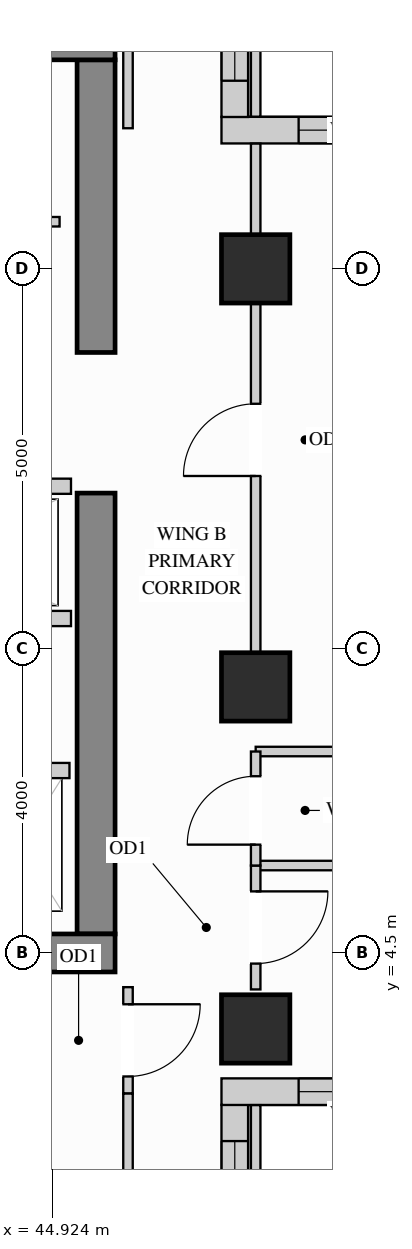
"""IFC4 building model, lengths in metres.
Left out: names, types, materials, properties, quantities, classifications, styles, units other than length and angle.
Written with IfcOpenShell. Run it as: python <this file> out.ifc"""

import sys

from ifc_helpers import new_model, si_unit, direction, frame, frame_2d, origin, origin_2d, place, context, subcontext, project, spatial, rectangle, extrude, source, transform, mapped, element, fill, save


model = new_model("IFC4")
c1 = context("Model", 3, precision=1e-05, world=origin(), true_north=direction((0.0, 1.0)))
c2 = subcontext(c1, "Body", "Model", "MODEL_VIEW")
j1 = project(units=[si_unit("LENGTHUNIT", "METRE"), si_unit("PLANEANGLEUNIT", "RADIAN")], contexts=[c1])
p1 = place(None, origin())
s1 = spatial("IfcSite", under=j1, at=p1, CompositionType="ELEMENT")
p2 = place(p1, origin())
s2 = spatial("IfcBuilding", under=s1, at=p2, CompositionType="ELEMENT")
p3 = place(p2, frame((0.0, 0.0, 255.6)))
s3 = spatial("IfcBuildingStorey", under=s2, at=p3, CompositionType="ELEMENT", Elevation=255.6)
m1 = source(origin(), c2, "Body", "SweptSolid", [
    extrude(rectangle(XDim=0.9, YDim=0.9, at=origin_2d()), origin(), (0.0, 0.0, 1.0), 3.4),
])
for number, where, z_axis, x_axis in (
    (1, (47.6, 13.5, 0.0), (0.0, 0.0, 1.0), (1.0, 0.0, 0.0)),
    (2, (47.6, 3.5, 0.0), (0.0, 0.0, 1.0), (1.0, 0.0, 0.0)),
    (3, (47.6, 8.0, 0.0), (0.0, 0.0, 1.0), (1.0, 0.0, 0.0)),
):
    element("IfcColumn", number, at=place(p3, frame(where, z_axis=z_axis, x_axis=x_axis)), inside=s3, PredefinedType="COLUMN", context=c2, shape_type="MappedRepresentation", body=[
        mapped(m1, transform((0.0, 0.0, 0.0), x_axis=(1.0, 0.0, 0.0), y_axis=(0.0, 1.0, 0.0), z_axis=(0.0, 0.0, 1.0))),
    ])
m2 = source(origin(), c2, "Body", "SweptSolid", [
    extrude(rectangle(XDim=5.8, YDim=0.5, at=frame_2d((2.9, 0.0))), origin(), (0.0, 0.0, 1.0), 3.4),
])
p4 = place(p3, frame((45.5, 4.75, 0.0), z_axis=(0.0, 0.0, 1.0), x_axis=(0.0, 1.0, 0.0)))
e4 = element("IfcWall", 4, at=p4, inside=s3, PredefinedType="SHEAR", context=c2, shape_type="MappedRepresentation", body=[
    mapped(m2, transform((0.0, 0.0, 0.0), x_axis=(1.0, 0.0, 0.0), y_axis=(0.0, 1.0, 0.0), z_axis=(0.0, 0.0, 1.0))),
])
m3 = source(origin(), c2, "Body", "SweptSolid", [
    extrude(rectangle(XDim=3.85, YDim=0.5, at=frame_2d((1.925, 0.0))), origin(), (0.0, 0.0, 1.0), 3.4),
])
p5 = place(p3, frame((45.5, 12.4, 0.0), z_axis=(0.0, 0.0, 1.0), x_axis=(0.0, 1.0, 0.0)))
e5 = element("IfcWall", 5, at=p5, inside=s3, PredefinedType="SHEAR", context=c2, shape_type="MappedRepresentation", body=[
    mapped(m3, transform((0.0, 0.0, 0.0), x_axis=(1.0, 0.0, 0.0), y_axis=(0.0, 1.0, 0.0), z_axis=(0.0, 0.0, 1.0))),
])
m4 = source(origin(), c2, "Body", "SweptSolid", [
    extrude(rectangle(XDim=10.0, YDim=0.5, at=frame_2d((5.0, 0.0))), origin(), (0.0, 0.0, 1.0), 3.4),
])
for number, where, z_axis, x_axis in (
    (6, (35.75, 16.5, 0.0), (0.0, 0.0, 1.0), (1.0, 0.0, 0.0)),
    (7, (35.75, 4.5, 0.0), (0.0, 0.0, 1.0), (1.0, 0.0, 0.0)),
):
    element("IfcWall", number, at=place(p3, frame(where, z_axis=z_axis, x_axis=x_axis)), inside=s3, PredefinedType="SHEAR", context=c2, shape_type="MappedRepresentation", body=[
        mapped(m4, transform((0.0, 0.0, 0.0), x_axis=(1.0, 0.0, 0.0), y_axis=(0.0, 1.0, 0.0), z_axis=(0.0, 0.0, 1.0))),
    ])
p6 = place(p3, frame((47.325, 0.348, 0.0), z_axis=(0.0, 0.0, 1.0), x_axis=(0.0, 1.0, 0.0)))
e8 = element("IfcWall", 8, at=p6, inside=s3, PredefinedType="SOLIDWALL", context=c2, shape_type="SweptSolid", body=[
    extrude(rectangle(XDim=2.154, YDim=0.35, at=frame_2d((1.077, 0.0))), origin(), (0.0, 0.0, 1.0), 3.385),
])
p7 = place(p6, frame((0.477, 0.0, 0.78)))
e9 = element("IfcOpeningElement", 9, at=p7, cuts=e8, PredefinedType="OPENING", context=c2, shape_type="SweptSolid", body=[
    extrude(rectangle(XDim=1.2, YDim=2.25, at=frame_2d((0.6, 1.125))), frame((0.0, 0.185, 0.0), z_axis=(0.0, -1.0, 0.0), x_axis=(1.0, 0.0, 0.0)), (0.0, 0.0, 1.0), 0.37),
])
p8 = place(p3, frame((47.15, 2.675, 0.0), z_axis=(0.0, 0.0, 1.0), x_axis=(1.0, 0.0, 0.0)))
e10 = element("IfcWall", 10, at=p8, inside=s3, PredefinedType="SOLIDWALL", context=c2, shape_type="SweptSolid", body=[
    extrude(rectangle(XDim=2.85, YDim=0.35, at=frame_2d((1.425, 0.0))), origin(), (0.0, 0.0, 1.0), 3.385),
])
p9 = place(p8, frame((1.015, 0.0, 0.78)))
e11 = element("IfcOpeningElement", 11, at=p9, cuts=e10, PredefinedType="OPENING", context=c2, shape_type="SweptSolid", body=[
    extrude(rectangle(XDim=1.2, YDim=2.25, at=frame_2d((0.6, 1.125))), frame((0.0, 0.185, 0.0), z_axis=(0.0, -1.0, 0.0), x_axis=(1.0, 0.0, 0.0)), (0.0, 0.0, 1.0), 0.37),
])
p10 = place(p3, frame((50.0, 15.325, 0.0), z_axis=(0.0, 0.0, 1.0), x_axis=(-1.0, 0.0, 0.0)))
e12 = element("IfcWall", 12, at=p10, inside=s3, PredefinedType="SOLIDWALL", context=c2, shape_type="SweptSolid", body=[
    extrude(rectangle(XDim=2.85, YDim=0.35, at=frame_2d((1.425, 0.0))), origin(), (0.0, 0.0, 1.0), 3.385),
])
p11 = place(p10, frame((0.635, 0.0, 0.78)))
e13 = element("IfcOpeningElement", 13, at=p11, cuts=e12, PredefinedType="OPENING", context=c2, shape_type="SweptSolid", body=[
    extrude(rectangle(XDim=1.2, YDim=2.25, at=frame_2d((0.6, 1.125))), frame((0.0, 0.185, 0.0), z_axis=(0.0, -1.0, 0.0), x_axis=(1.0, 0.0, 0.0)), (0.0, 0.0, 1.0), 0.37),
])
p12 = place(p3, frame((47.325, 15.498, 0.0), z_axis=(0.0, 0.0, 1.0), x_axis=(0.0, 1.0, 0.0)))
e14 = element("IfcWall", 14, at=p12, inside=s3, PredefinedType="SOLIDWALL", context=c2, shape_type="SweptSolid", body=[
    extrude(rectangle(XDim=2.154, YDim=0.35, at=frame_2d((1.077, 0.0))), origin(), (0.0, 0.0, 1.0), 3.385),
])
p13 = place(p12, frame((0.477, 0.0, 0.78)))
e15 = element("IfcOpeningElement", 15, at=p13, cuts=e14, PredefinedType="OPENING", context=c2, shape_type="SweptSolid", body=[
    extrude(rectangle(XDim=1.2, YDim=2.25, at=frame_2d((0.6, 1.125))), frame((0.0, 0.185, 0.0), z_axis=(0.0, -1.0, 0.0), x_axis=(1.0, 0.0, 0.0)), (0.0, 0.0, 1.0), 0.37),
])
p14 = place(p3, frame((36.5, 14.12, 0.0), z_axis=(0.0, 0.0, 1.0), x_axis=(1.0, 0.0, 0.0)))
e16 = element("IfcWall", 16, at=p14, inside=s3, PredefinedType="PARTITIONING", context=c2, shape_type="SweptSolid", body=[
    extrude(rectangle(XDim=8.52, YDim=0.125, at=frame_2d((4.26, 0.0))), origin(), (0.0, 0.0, 1.0), 3.385),
])
p15 = place(p14, frame((3.785, 0.0, 0.0)))
e17 = element("IfcOpeningElement", 17, at=p15, cuts=e16, PredefinedType="OPENING", context=c2, shape_type="SweptSolid", body=[
    extrude(rectangle(XDim=0.95, YDim=2.15, at=frame_2d((0.475, 1.075))), frame((0.0, 0.073, 0.0), z_axis=(0.0, -1.0, 0.0), x_axis=(1.0, 0.0, 0.0)), (0.0, 0.0, 1.0), 0.145),
])
m5 = source(origin(), c2, "Body", "SweptSolid", [
    extrude(rectangle(XDim=2.048, YDim=0.125, at=frame_2d((1.024, 0.0))), origin(), (0.0, 0.0, 1.0), 3.385),
])
for number, where, z_axis, x_axis in (
    (18, (47.6, 5.65, 0.0), (0.0, 0.0, 1.0), (1.0, 0.0, 0.0)),
    (19, (47.6, 7.15, 0.0), (0.0, 0.0, 1.0), (1.0, 0.0, 0.0)),
):
    element("IfcWall", number, at=place(p3, frame(where, z_axis=z_axis, x_axis=x_axis)), inside=s3, PredefinedType="PARTITIONING", context=c2, shape_type="MappedRepresentation", body=[
        mapped(m5, transform((0.0, 0.0, 0.0), x_axis=(1.0, 0.0, 0.0), y_axis=(0.0, 1.0, 0.0), z_axis=(0.0, 0.0, 1.0))),
    ])
p16 = place(p3, frame((47.6, 4.02, 0.0), z_axis=(0.0, 0.0, 1.0), x_axis=(0.0, 1.0, 0.0)))
e20 = element("IfcWall", 20, at=p16, inside=s3, PredefinedType="PARTITIONING", context=c2, shape_type="SweptSolid", body=[
    extrude(rectangle(XDim=1.63, YDim=0.125, at=frame_2d((0.815, 0.0))), origin(), (0.0, 0.0, 1.0), 2.773),
])
p17 = place(p16, frame((0.34, 0.0, 0.0)))
e21 = element("IfcOpeningElement", 21, at=p17, cuts=e20, PredefinedType="OPENING", context=c2, shape_type="SweptSolid", body=[
    extrude(rectangle(XDim=0.95, YDim=2.15, at=frame_2d((0.475, 1.075))), frame((0.0, 0.073, 0.0), z_axis=(0.0, -1.0, 0.0), x_axis=(1.0, 0.0, 0.0)), (0.0, 0.0, 1.0), 0.145),
])
m6 = source(origin(), c2, "Body", "SweptSolid", [
    extrude(rectangle(XDim=2.148, YDim=0.125, at=frame_2d((1.074, 0.0))), origin(), (0.0, 0.0, 1.0), 3.385),
])
p18 = place(p3, frame((47.6, 0.35, 0.0), z_axis=(0.0, 0.0, 1.0), x_axis=(0.0, 1.0, 0.0)))
e22 = element("IfcWall", 22, at=p18, inside=s3, PredefinedType="PARTITIONING", context=c2, shape_type="MappedRepresentation", body=[
    mapped(m6, transform((0.0, 0.0, 0.0), x_axis=(1.0, 0.0, 0.0), y_axis=(0.0, 1.0, 0.0), z_axis=(0.0, 0.0, 1.0))),
])
p19 = place(p3, frame((47.6, 8.45, 0.0), z_axis=(0.0, 0.0, 1.0), x_axis=(0.0, 1.0, 0.0)))
e23 = element("IfcWall", 23, at=p19, inside=s3, PredefinedType="PARTITIONING", context=c2, shape_type="SweptSolid", body=[
    extrude(rectangle(XDim=4.6, YDim=0.125, at=frame_2d((2.3, 0.0))), origin(), (0.0, 0.0, 1.0), 2.773),
])
p20 = place(p19, frame((2.325, 0.0, 0.0)))
e24 = element("IfcOpeningElement", 24, at=p20, cuts=e23, PredefinedType="OPENING", context=c2, shape_type="SweptSolid", body=[
    extrude(rectangle(XDim=0.95, YDim=2.15, at=frame_2d((0.475, 1.075))), frame((0.0, 0.073, 0.0), z_axis=(0.0, -1.0, 0.0), x_axis=(1.0, 0.0, 0.0)), (0.0, 0.0, 1.0), 0.145),
])
m7 = source(origin(), c2, "Body", "SweptSolid", [
    extrude(rectangle(XDim=1.198, YDim=0.125, at=frame_2d((0.599, 0.0))), origin(), (0.0, 0.0, 1.0), 3.385),
])
p21 = place(p3, frame((47.6, 13.95, 0.0), z_axis=(0.0, 0.0, 1.0), x_axis=(0.0, 1.0, 0.0)))
e25 = element("IfcWall", 25, at=p21, inside=s3, PredefinedType="PARTITIONING", context=c2, shape_type="MappedRepresentation", body=[
    mapped(m7, transform((0.0, 0.0, 0.0), x_axis=(1.0, 0.0, 0.0), y_axis=(0.0, 1.0, 0.0), z_axis=(0.0, 0.0, 1.0))),
])
p22 = place(p3, frame((47.6, 15.502, 0.0), z_axis=(0.0, 0.0, 1.0), x_axis=(0.0, 1.0, 0.0)))
e26 = element("IfcWall", 26, at=p22, inside=s3, PredefinedType="PARTITIONING", context=c2, shape_type="MappedRepresentation", body=[
    mapped(m6, transform((0.0, 0.0, 0.0), x_axis=(1.0, 0.0, 0.0), y_axis=(0.0, 1.0, 0.0), z_axis=(0.0, 0.0, 1.0))),
])
p23 = place(p3, frame((47.6, 5.65, 0.0), z_axis=(0.0, 0.0, 1.0), x_axis=(0.0, 1.0, 0.0)))
e27 = element("IfcWall", 27, at=p23, inside=s3, PredefinedType="PARTITIONING", context=c2, shape_type="SweptSolid", body=[
    extrude(rectangle(XDim=1.5, YDim=0.125, at=frame_2d((0.75, 0.0))), origin(), (0.0, 0.0, 1.0), 2.773),
])
p24 = place(p23, frame((0.275, 0.0, 0.0)))
e28 = element("IfcOpeningElement", 28, at=p24, cuts=e27, PredefinedType="OPENING", context=c2, shape_type="SweptSolid", body=[
    extrude(rectangle(XDim=0.9, YDim=2.15, at=frame_2d((0.45, 1.075))), frame((0.0, 0.073, 0.0), z_axis=(0.0, -1.0, 0.0), x_axis=(1.0, 0.0, 0.0)), (0.0, 0.0, 1.0), 0.145),
])
m8 = source(origin(), c2, "Body", "SweptSolid", [
    extrude(rectangle(XDim=2.298, YDim=0.125, at=frame_2d((1.149, 0.0))), origin(), (0.0, 0.0, 1.0), 3.385),
])
p25 = place(p3, frame((45.92, 15.35, 0.0), z_axis=(0.0, 0.0, 1.0), x_axis=(0.0, 1.0, 0.0)))
e29 = element("IfcWall", 29, at=p25, inside=s3, PredefinedType="PARTITIONING", context=c2, shape_type="MappedRepresentation", body=[
    mapped(m8, transform((0.0, 0.0, 0.0), x_axis=(1.0, 0.0, 0.0), y_axis=(0.0, 1.0, 0.0), z_axis=(0.0, 0.0, 1.0))),
])
p26 = place(p3, frame((45.92, 2.65, 0.0), z_axis=(0.0, 0.0, 1.0), x_axis=(0.0, 1.0, 0.0)))
e30 = element("IfcWall", 30, at=p26, inside=s3, PredefinedType="PARTITIONING", context=c2, shape_type="SweptSolid", body=[
    extrude(rectangle(XDim=1.4, YDim=0.125, at=frame_2d((0.7, 0.0))), origin(), (0.0, 0.0, 1.0), 3.385),
])
p27 = place(p26, frame((0.225, 0.0, 0.0)))
e31 = element("IfcOpeningElement", 31, at=p27, cuts=e30, PredefinedType="OPENING", context=c2, shape_type="SweptSolid", body=[
    extrude(rectangle(XDim=0.95, YDim=2.15, at=frame_2d((0.475, 1.075))), frame((0.0, 0.073, 0.0), z_axis=(0.0, -1.0, 0.0), x_axis=(1.0, 0.0, 0.0)), (0.0, 0.0, 1.0), 0.145),
])
p28 = place(p3, frame((45.92, 0.352, 0.0), z_axis=(0.0, 0.0, 1.0), x_axis=(0.0, 1.0, 0.0)))
e32 = element("IfcWall", 32, at=p28, inside=s3, PredefinedType="PARTITIONING", context=c2, shape_type="MappedRepresentation", body=[
    mapped(m8, transform((0.0, 0.0, 0.0), x_axis=(1.0, 0.0, 0.0), y_axis=(0.0, 1.0, 0.0), z_axis=(0.0, 0.0, 1.0))),
])
m9 = source(origin(), c2, "Body", "SweptSolid", [
    extrude(rectangle(XDim=1.3, YDim=0.2, at=frame_2d((0.65, 0.0))), origin(), (0.0, 0.0, 1.0), 3.385),
])
p29 = place(p3, frame((43.85, 6.9, 0.0), z_axis=(0.0, 0.0, 1.0), x_axis=(1.0, 0.0, 0.0)))
e33 = element("IfcWall", 33, at=p29, inside=s3, PredefinedType="PARTITIONING", context=c2, shape_type="MappedRepresentation", body=[
    mapped(m9, transform((0.0, 0.0, 0.0), x_axis=(1.0, 0.0, 0.0), y_axis=(0.0, 1.0, 0.0), z_axis=(0.0, 0.0, 1.0))),
])
m10 = source(origin(), c2, "Body", "SweptSolid", [
    extrude(rectangle(XDim=3.49, YDim=0.2, at=frame_2d((1.745, 0.0))), origin(), (0.0, 0.0, 1.0), 3.385),
])
for number, where, z_axis, x_axis in (
    (34, (41.68, 10.64, 0.0), (0.0, 0.0, 1.0), (1.0, 0.0, 0.0)),
    (35, (41.68, 8.9, 0.0), (0.0, 0.0, 1.0), (1.0, 0.0, 0.0)),
):
    element("IfcWall", number, at=place(p3, frame(where, z_axis=z_axis, x_axis=x_axis)), inside=s3, PredefinedType="PARTITIONING", context=c2, shape_type="MappedRepresentation", body=[
        mapped(m10, transform((0.0, 0.0, 0.0), x_axis=(1.0, 0.0, 0.0), y_axis=(0.0, 1.0, 0.0), z_axis=(0.0, 0.0, 1.0))),
    ])
m11 = source(origin(), c2, "Body", "SweptSolid", [
    extrude(rectangle(XDim=0.95, YDim=2.15, at=frame_2d((0.475, 1.075))), frame((0.0, 0.025, 0.0), z_axis=(0.0, -1.0, 0.0), x_axis=(1.0, 0.0, 0.0)), (0.0, 0.0, 1.0), 0.05),
])
p30 = place(p27, origin())
e36 = element("IfcDoor", 36, at=p30, inside=s3, OperationType="SINGLE_SWING_RIGHT", PredefinedType="DOOR", context=c2, shape_type="MappedRepresentation", body=[
    mapped(m11, transform((0.0, 0.0, 0.0), x_axis=(1.0, 0.0, 0.0), y_axis=(0.0, 1.0, 0.0), z_axis=(0.0, 0.0, 1.0))),
])
fill(e31, e36)
p31 = place(p17, origin())
e37 = element("IfcDoor", 37, at=p31, inside=s3, OperationType="SINGLE_SWING_RIGHT", PredefinedType="DOOR", context=c2, shape_type="MappedRepresentation", body=[
    mapped(m11, transform((0.0, 0.0, 0.0), x_axis=(1.0, 0.0, 0.0), y_axis=(0.0, 1.0, 0.0), z_axis=(0.0, 0.0, 1.0))),
])
fill(e21, e37)
p32 = place(p20, origin())
e38 = element("IfcDoor", 38, at=p32, inside=s3, OperationType="SINGLE_SWING_LEFT", PredefinedType="DOOR", context=c2, shape_type="MappedRepresentation", body=[
    mapped(m11, transform((0.0, 0.0, 0.0), x_axis=(1.0, 0.0, 0.0), y_axis=(0.0, 1.0, 0.0), z_axis=(0.0, 0.0, 1.0))),
])
fill(e24, e38)
m12 = source(origin(), c2, "Body", "SweptSolid", [
    extrude(rectangle(XDim=0.9, YDim=2.15, at=frame_2d((0.45, 1.075))), frame((0.0, 0.025, 0.0), z_axis=(0.0, -1.0, 0.0), x_axis=(1.0, 0.0, 0.0)), (0.0, 0.0, 1.0), 0.05),
])
p33 = place(p24, origin())
e39 = element("IfcDoor", 39, at=p33, inside=s3, OperationType="SINGLE_SWING_LEFT", PredefinedType="DOOR", context=c2, shape_type="MappedRepresentation", body=[
    mapped(m12, transform((0.0, 0.0, 0.0), x_axis=(1.0, 0.0, 0.0), y_axis=(0.0, 1.0, 0.0), z_axis=(0.0, 0.0, 1.0))),
])
fill(e28, e39)
m13 = source(origin(), c2, "Body", "SweptSolid", [
    extrude(rectangle(XDim=1.2, YDim=2.25, at=frame_2d((0.6, 1.125))), frame((0.0, 0.03, 0.0), z_axis=(0.0, -1.0, 0.0), x_axis=(1.0, 0.0, 0.0)), (0.0, 0.0, 1.0), 0.06),
])
p34 = place(p7, origin())
e40 = element("IfcWindow", 40, at=p34, inside=s3, PartitioningType="SINGLE_PANEL", PredefinedType="WINDOW", context=c2, shape_type="MappedRepresentation", body=[
    mapped(m13, transform((0.0, 0.0, 0.0), x_axis=(1.0, 0.0, 0.0), y_axis=(0.0, 1.0, 0.0), z_axis=(0.0, 0.0, 1.0))),
])
fill(e9, e40)
p35 = place(p9, origin())
e41 = element("IfcWindow", 41, at=p35, inside=s3, PartitioningType="SINGLE_PANEL", PredefinedType="WINDOW", context=c2, shape_type="MappedRepresentation", body=[
    mapped(m13, transform((0.0, 0.0, 0.0), x_axis=(1.0, 0.0, 0.0), y_axis=(0.0, 1.0, 0.0), z_axis=(0.0, 0.0, 1.0))),
])
fill(e11, e41)
p36 = place(p11, origin())
e42 = element("IfcWindow", 42, at=p36, inside=s3, PartitioningType="SINGLE_PANEL", PredefinedType="WINDOW", context=c2, shape_type="MappedRepresentation", body=[
    mapped(m13, transform((0.0, 0.0, 0.0), x_axis=(1.0, 0.0, 0.0), y_axis=(0.0, 1.0, 0.0), z_axis=(0.0, 0.0, 1.0))),
])
fill(e13, e42)
p37 = place(p13, origin())
e43 = element("IfcWindow", 43, at=p37, inside=s3, PartitioningType="SINGLE_PANEL", PredefinedType="WINDOW", context=c2, shape_type="MappedRepresentation", body=[
    mapped(m13, transform((0.0, 0.0, 0.0), x_axis=(1.0, 0.0, 0.0), y_axis=(0.0, 1.0, 0.0), z_axis=(0.0, 0.0, 1.0))),
])
fill(e15, e43)
save(model, sys.argv[1])
